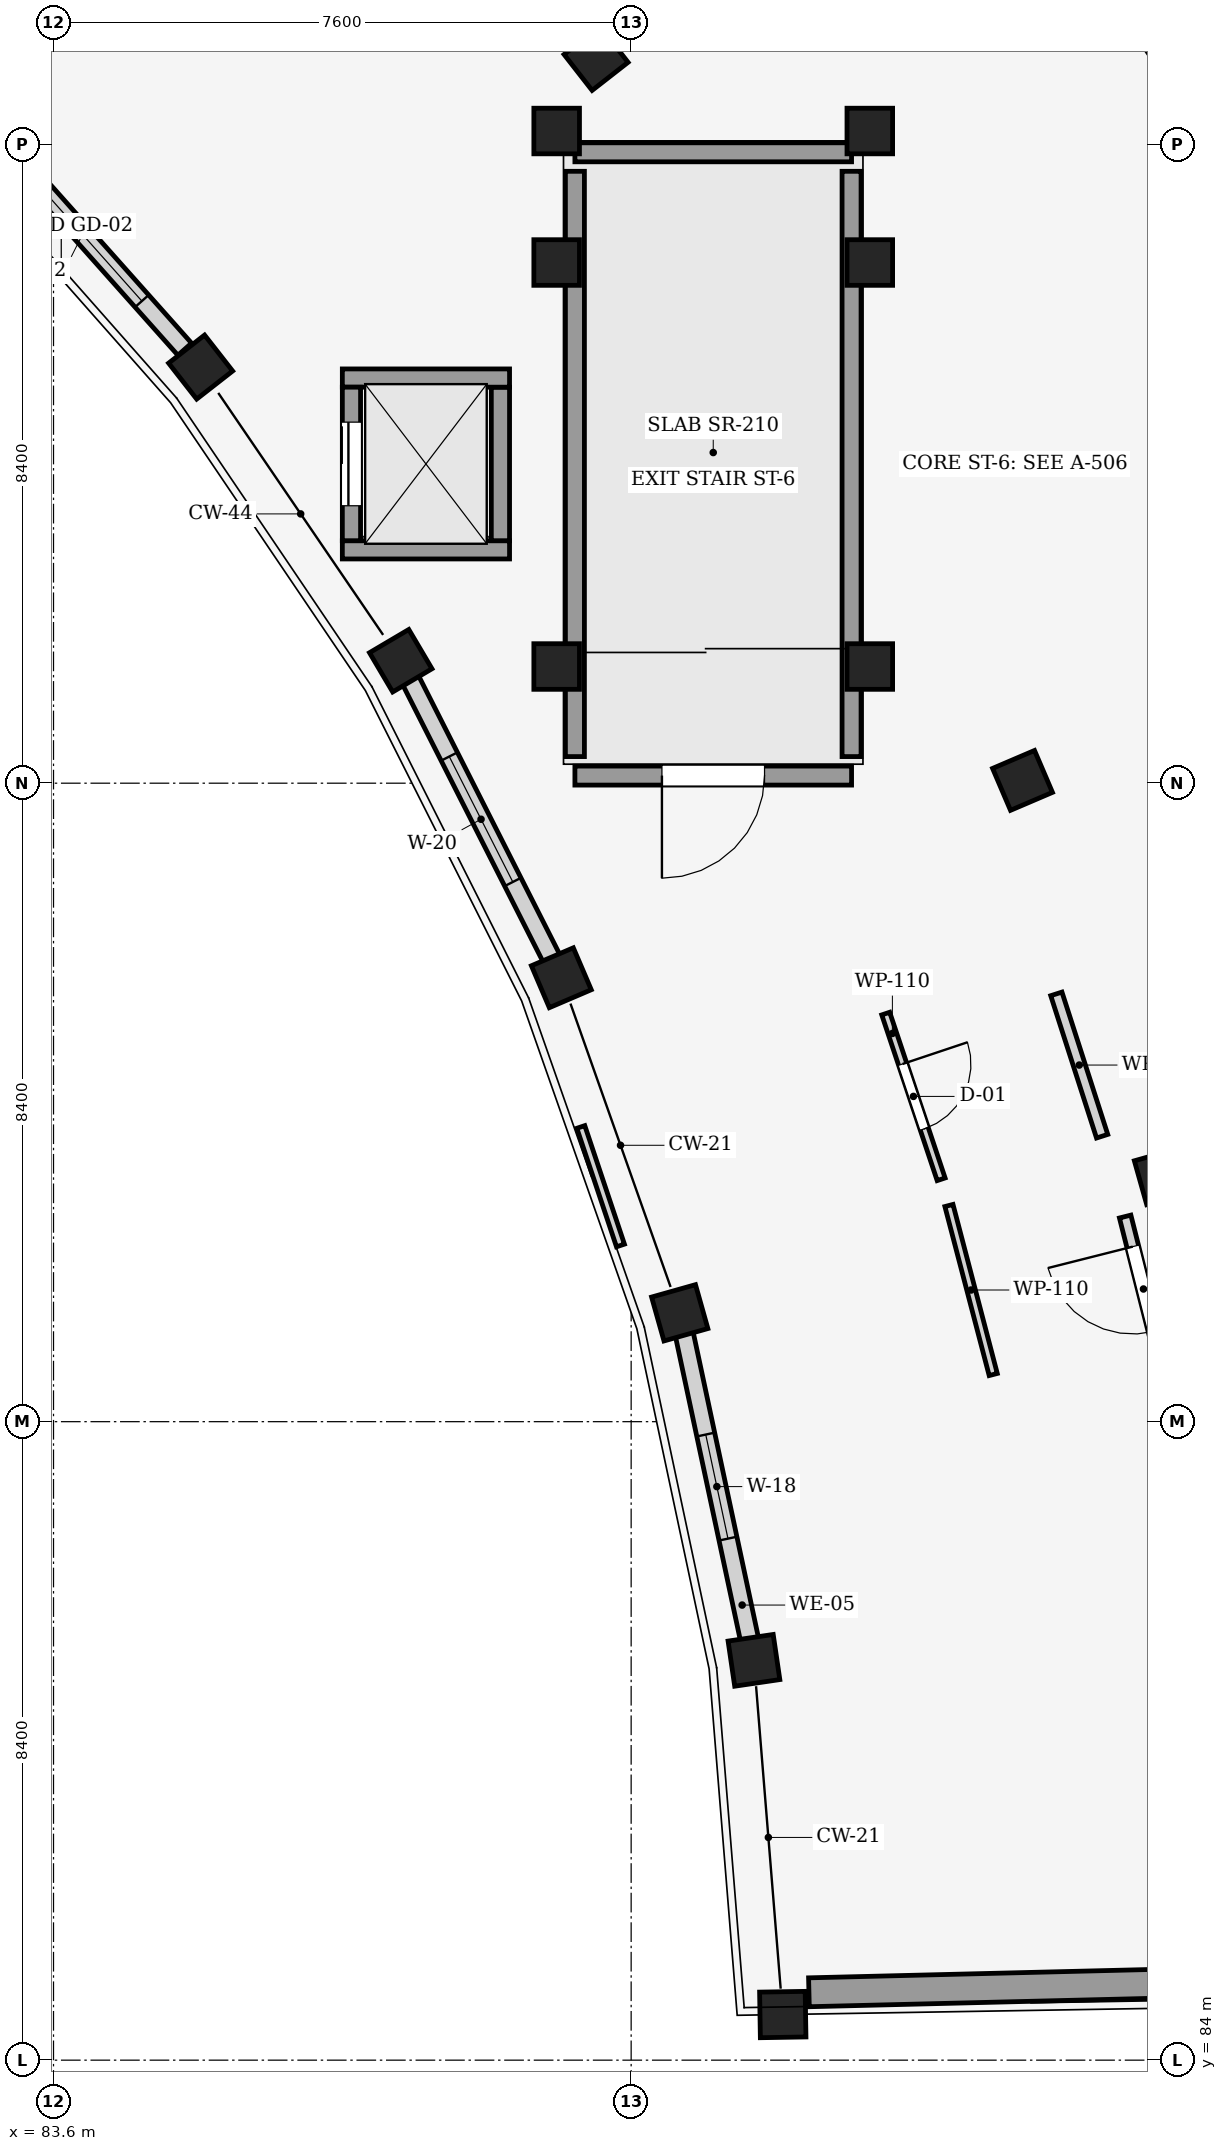
"""IFC4 building model, lengths in metres.
Left out: names, types, materials, properties, quantities, classifications, styles, units other than length and angle.
Written with IfcOpenShell. Run it as: python <this file> out.ifc"""

import sys

from ifc_helpers import new_model, si_unit, direction, frame, frame_2d, origin, origin_2d, place, context, subcontext, project, spatial, rectangle, extrude, element, fill, save


model = new_model("IFC4")
c1 = context("Model", 3, precision=1e-05, world=origin(), true_north=direction((0.0, 1.0)))
c2 = subcontext(c1, "Body", "Model", "MODEL_VIEW")
j1 = project(units=[si_unit("LENGTHUNIT", "METRE"), si_unit("PLANEANGLEUNIT", "RADIAN")], contexts=[c1])
p1 = place(None, origin())
s1 = spatial("IfcSite", under=j1, at=p1, CompositionType="ELEMENT")
p2 = place(p1, origin())
s2 = spatial("IfcBuilding", under=s1, at=p2, CompositionType="ELEMENT")
p3 = place(p2, frame((0.0, 0.0, 25.35)))
s3 = spatial("IfcBuildingStorey", under=s2, at=p3, CompositionType="ELEMENT", Elevation=25.35)
for number, where, z_axis, x_axis in (
    (1, (93.195, 84.6, 0.0), (0.0, 0.0, 1.0), (1.0, 0.017, 0.0)),
    (2, (92.816, 89.26, 0.0), (0.0, 0.0, 1.0), (0.989, 0.145, 0.0)),
    (3, (91.839, 93.832, 0.0), (0.0, 0.0, 1.0), (0.962, 0.272, 0.0)),
    (4, (98.191, 95.625, 0.0), (0.0, 0.0, 1.0), (0.962, 0.272, 0.0)),
    (5, (90.281, 98.24, 0.0), (0.0, 0.0, 1.0), (0.919, 0.393, 0.0)),
    (6, (96.349, 100.837, 0.0), (0.0, 0.0, 1.0), (0.919, 0.393, 0.0)),
    (7, (88.168, 102.411, 0.0), (0.0, 0.0, 1.0), (0.861, 0.509, 0.0)),
    (8, (85.536, 106.274, 0.0), (0.0, 0.0, 1.0), (0.788, 0.615, 0.0)),
    (9, (90.738, 110.336, 0.0), (0.0, 0.0, 1.0), (0.788, 0.615, 0.0)),
):
    element("IfcColumn", number, at=place(p3, frame(where, z_axis=z_axis, x_axis=x_axis)), inside=s3, PredefinedType="COLUMN", context=c2, shape_type="SweptSolid", body=[
        extrude(rectangle(XDim=0.6, YDim=0.6, at=origin_2d()), origin(), (0.0, 0.0, 1.0), 4.05),
    ])
for number, where, z_axis, x_axis in (
    (10, (94.34, 102.335, 0.0), (0.0, 0.0, 1.0), (1.0, 0.0, 0.0)),
    (11, (90.22, 102.335, 0.0), (0.0, 0.0, 1.0), (1.0, 0.0, 0.0)),
    (12, (94.34, 107.65, 0.0), (0.0, 0.0, 1.0), (1.0, 0.0, 0.0)),
    (13, (90.22, 107.65, 0.0), (0.0, 0.0, 1.0), (1.0, 0.0, 0.0)),
    (14, (94.34, 109.38, 0.0), (0.0, 0.0, 1.0), (1.0, 0.0, 0.0)),
    (15, (90.22, 109.38, 0.0), (0.0, 0.0, 1.0), (1.0, 0.0, 0.0)),
):
    element("IfcColumn", number, at=place(p3, frame(where, z_axis=z_axis, x_axis=x_axis)), inside=s3, PredefinedType="COLUMN", context=c2, shape_type="SweptSolid", body=[
        extrude(rectangle(XDim=0.6, YDim=0.6, at=origin_2d()), origin(), (0.0, 0.0, 1.0), 3.1),
    ])
p4 = place(p3, frame((92.766, 89.495, 0.0), z_axis=(0.0, 0.0, 1.0), x_axis=(-0.208893062569, 0.977938489073, 0.0)))
e16 = element("IfcWall", 16, at=p4, inside=s3, PredefinedType="STANDARD", context=c2, shape_type="SweptSolid", body=[
    extrude(rectangle(XDim=4.195, YDim=0.24, at=frame_2d((2.097, 0.0))), origin(), (0.0, 0.0, 1.0), 3.035),
])
p5 = place(p4, frame((1.397, 0.0, 0.85)))
e17 = element("IfcOpeningElement", 17, at=p5, cuts=e16, PredefinedType="OPENING", context=c2, shape_type="SweptSolid", body=[
    extrude(rectangle(XDim=1.4, YDim=1.65, at=frame_2d((0.7, 0.825))), frame((0.0, 0.13, 0.0), z_axis=(0.0, -1.0, 0.0), x_axis=(1.0, 0.0, 0.0)), (0.0, 0.0, 1.0), 0.26),
])
p6 = place(p3, frame((90.162, 98.475, 0.0), z_axis=(0.0, 0.0, 1.0), x_axis=(-0.451915465701, 0.89206076691, 0.0)))
e18 = element("IfcWall", 18, at=p6, inside=s3, PredefinedType="STANDARD", context=c2, shape_type="SweptSolid", body=[
    extrude(rectangle(XDim=4.148, YDim=0.24, at=frame_2d((2.074, 0.0))), origin(), (0.0, 0.0, 1.0), 3.7),
])
p7 = place(p6, frame((1.149, 0.0, 0.85)))
e19 = element("IfcOpeningElement", 19, at=p7, cuts=e18, PredefinedType="OPENING", context=c2, shape_type="SweptSolid", body=[
    extrude(rectangle(XDim=1.85, YDim=1.65, at=frame_2d((0.925, 0.825))), frame((0.0, 0.13, 0.0), z_axis=(0.0, -1.0, 0.0), x_axis=(1.0, 0.0, 0.0)), (0.0, 0.0, 1.0), 0.26),
])
p8 = place(p3, frame((95.786, 113.916, 0.0), z_axis=(0.0, 0.0, 1.0), x_axis=(0.563132935525, -0.826366321269, 0.0)))
e20 = element("IfcWall", 20, at=p8, inside=s3, PredefinedType="STANDARD", context=c2, shape_type="SweptSolid", body=[
    extrude(rectangle(XDim=5.76, YDim=0.29, at=frame_2d((2.88, 0.0))), origin(), (0.0, 0.0, 1.0), 3.035),
])
p9 = place(p8, frame((2.155, 0.0, 0.85)))
e21 = element("IfcOpeningElement", 21, at=p9, cuts=e20, PredefinedType="OPENING", context=c2, shape_type="SweptSolid", body=[
    extrude(rectangle(XDim=1.45, YDim=1.5, at=frame_2d((0.725, 0.75))), frame((0.0, 0.155, 0.0), z_axis=(0.0, -1.0, 0.0), x_axis=(1.0, 0.0, 0.0)), (0.0, 0.0, 1.0), 0.31),
])
p10 = place(p3, frame((85.326, 106.51, 0.0), z_axis=(0.0, 0.0, 1.0), x_axis=(-0.664947894459, 0.74688974933, 0.0)))
e22 = element("IfcWall", 22, at=p10, inside=s3, PredefinedType="STANDARD", context=c2, shape_type="SweptSolid", body=[
    extrude(rectangle(XDim=4.046, YDim=0.24, at=frame_2d((2.023, 0.0))), origin(), (0.0, 0.0, 1.0), 3.185),
])
p11 = place(p10, frame((0.848, 0.0, 0.85)))
e23 = element("IfcOpeningElement", 23, at=p11, cuts=e22, PredefinedType="OPENING", context=c2, shape_type="SweptSolid", body=[
    extrude(rectangle(XDim=2.35, YDim=1.65, at=frame_2d((1.175, 0.825))), frame((0.0, 0.13, 0.0), z_axis=(0.0, -1.0, 0.0), x_axis=(1.0, 0.0, 0.0)), (0.0, 0.0, 1.0), 0.26),
])
p12 = place(p3, frame((105.635, 85.189, 0.0), z_axis=(0.0, 0.0, 1.0), x_axis=(-0.999701441778, -0.024434142249, 0.0)))
e24 = element("IfcWall", 24, at=p12, inside=s3, PredefinedType="SHEAR", context=c2, shape_type="SweptSolid", body=[
    extrude(rectangle(XDim=12.1, YDim=0.38, at=frame_2d((6.05, 0.0))), origin(), (0.0, 0.0, 1.0), 3.75),
])
p13 = place(p3, frame((94.1, 100.9, 0.0), z_axis=(0.0, 0.0, 1.0), x_axis=(-1.0, 0.0, 0.0)))
e25 = element("IfcWall", 25, at=p13, inside=s3, PredefinedType="SHEAR", context=c2, shape_type="SweptSolid", body=[
    extrude(rectangle(XDim=3.64, YDim=0.25, at=frame_2d((1.82, 0.0))), origin(), (0.0, 0.0, 1.0), 3.1),
])
p14 = place(p13, frame((1.145, 0.0, 0.0)))
e26 = element("IfcOpeningElement", 26, at=p14, cuts=e25, PredefinedType="OPENING", context=c2, shape_type="SweptSolid", body=[
    extrude(rectangle(XDim=1.35, YDim=2.2, at=frame_2d((0.675, 1.1))), frame((0.0, 0.135, 0.0), z_axis=(0.0, -1.0, 0.0), x_axis=(1.0, 0.0, 0.0)), (0.0, 0.0, 1.0), 0.27),
])
p15 = place(p3, frame((90.46, 101.15, 0.0), z_axis=(0.0, 0.0, 1.0), x_axis=(0.0, 1.0, 0.0)))
e27 = element("IfcWall", 27, at=p15, inside=s3, PredefinedType="SHEAR", context=c2, shape_type="SweptSolid", body=[
    extrude(rectangle(XDim=7.7, YDim=0.25, at=frame_2d((3.85, 0.0))), origin(), (0.0, 0.0, 1.0), 3.1),
])
p16 = place(p3, frame((90.46, 109.1, 0.0), z_axis=(0.0, 0.0, 1.0), x_axis=(1.0, 0.0, 0.0)))
e28 = element("IfcWall", 28, at=p16, inside=s3, PredefinedType="SHEAR", context=c2, shape_type="SweptSolid", body=[
    extrude(rectangle(XDim=3.64, YDim=0.25, at=frame_2d((1.82, 0.0))), origin(), (0.0, 0.0, 1.0), 3.1),
])
p17 = place(p3, frame((94.1, 108.85, 0.0), z_axis=(0.0, 0.0, 1.0), x_axis=(0.0, -1.0, 0.0)))
e29 = element("IfcWall", 29, at=p17, inside=s3, PredefinedType="SHEAR", context=c2, shape_type="SweptSolid", body=[
    extrude(rectangle(XDim=7.7, YDim=0.25, at=frame_2d((3.85, 0.0))), origin(), (0.0, 0.0, 1.0), 3.1),
])
p18 = place(p3, frame((89.6, 103.87, 0.0), z_axis=(0.0, 0.0, 1.0), x_axis=(-1.0, 0.0, 0.0)))
e30 = element("IfcWall", 30, at=p18, inside=s3, PredefinedType="SHEAR", context=c2, shape_type="SweptSolid", body=[
    extrude(rectangle(XDim=2.2, YDim=0.24, at=frame_2d((1.1, 0.0))), origin(), (0.0, 0.0, 1.0), 4.05),
])
p19 = place(p3, frame((89.48, 106.01, 0.0), z_axis=(0.0, 0.0, 1.0), x_axis=(0.0, -1.0, 0.0)))
e31 = element("IfcWall", 31, at=p19, inside=s3, PredefinedType="SHEAR", context=c2, shape_type="SweptSolid", body=[
    extrude(rectangle(XDim=2.02, YDim=0.24, at=frame_2d((1.01, 0.0))), origin(), (0.0, 0.0, 1.0), 4.05),
])
p20 = place(p3, frame((87.4, 106.13, 0.0), z_axis=(0.0, 0.0, 1.0), x_axis=(1.0, 0.0, 0.0)))
e32 = element("IfcWall", 32, at=p20, inside=s3, PredefinedType="SHEAR", context=c2, shape_type="SweptSolid", body=[
    extrude(rectangle(XDim=2.2, YDim=0.24, at=frame_2d((1.1, 0.0))), origin(), (0.0, 0.0, 1.0), 4.05),
])
p21 = place(p3, frame((87.52, 103.99, 0.0), z_axis=(0.0, 0.0, 1.0), x_axis=(0.0, 1.0, 0.0)))
e33 = element("IfcWall", 33, at=p21, inside=s3, PredefinedType="SHEAR", context=c2, shape_type="SweptSolid", body=[
    extrude(rectangle(XDim=2.02, YDim=0.24, at=frame_2d((1.01, 0.0))), origin(), (0.0, 0.0, 1.0), 4.05),
])
p22 = place(p21, frame((0.46, 0.0, 0.0)))
e34 = element("IfcOpeningElement", 34, at=p22, cuts=e33, PredefinedType="OPENING", context=c2, shape_type="SweptSolid", body=[
    extrude(rectangle(XDim=1.1, YDim=2.15, at=frame_2d((0.55, 1.075))), frame((0.0, 0.13, 0.0), z_axis=(0.0, -1.0, 0.0), x_axis=(1.0, 0.0, 0.0)), (0.0, 0.0, 1.0), 0.26),
])
p23 = place(p3, frame((98.181, 93.191, 0.0), z_axis=(0.0, 0.0, 1.0), x_axis=(-0.244871130076, 0.969555635152, 0.0)))
e35 = element("IfcWall", 35, at=p23, inside=s3, PredefinedType="PARTITIONING", context=c2, shape_type="SweptSolid", body=[
    extrude(rectangle(XDim=1.967, YDim=0.155, at=frame_2d((0.983, 0.0))), origin(), (0.0, 0.0, 1.0), 3.035),
])
p24 = place(p23, frame((0.409, 0.0, 0.0)))
e36 = element("IfcOpeningElement", 36, at=p24, cuts=e35, PredefinedType="OPENING", context=c2, shape_type="SweptSolid", body=[
    extrude(rectangle(XDim=1.15, YDim=2.22, at=frame_2d((0.575, 1.11))), frame((0.0, 0.087, 0.0), z_axis=(0.0, -1.0, 0.0), x_axis=(1.0, 0.0, 0.0)), (0.0, 0.0, 1.0), 0.175),
])
p25 = place(p3, frame((97.397, 96.156, 0.0), z_axis=(0.0, 0.0, 1.0), x_axis=(-0.306193985411, 0.951969139887, 0.0)))
e37 = element("IfcWall", 37, at=p25, inside=s3, PredefinedType="PARTITIONING", context=c2, shape_type="SweptSolid", body=[
    extrude(rectangle(XDim=1.967, YDim=0.155, at=frame_2d((0.983, 0.0))), origin(), (0.0, 0.0, 1.0), 3.72),
])
p26 = place(p3, frame((94.55, 97.769, 0.0), z_axis=(0.0, 0.0, 1.0), x_axis=(0.317151668087, -0.94837483066, 0.0)))
e38 = element("IfcWall", 38, at=p26, inside=s3, PredefinedType="PARTITIONING", context=c2, shape_type="SweptSolid", body=[
    extrude(rectangle(XDim=2.299, YDim=0.11, at=frame_2d((1.149, 0.0))), origin(), (0.0, 0.0, 1.0), 3.72),
])
p27 = place(p26, frame((0.699, 0.0, 0.0)))
e39 = element("IfcOpeningElement", 39, at=p27, cuts=e38, PredefinedType="OPENING", context=c2, shape_type="SweptSolid", body=[
    extrude(rectangle(XDim=0.9, YDim=2.1, at=frame_2d((0.45, 1.05))), frame((0.0, 0.065, 0.0), z_axis=(0.0, -1.0, 0.0), x_axis=(1.0, 0.0, 0.0)), (0.0, 0.0, 1.0), 0.13),
])
p28 = place(p3, frame((95.381, 95.244, 0.0), z_axis=(0.0, 0.0, 1.0), x_axis=(0.253416186792, -0.96735734673, 0.0)))
e40 = element("IfcWall", 40, at=p28, inside=s3, PredefinedType="PARTITIONING", context=c2, shape_type="SweptSolid", body=[
    extrude(rectangle(XDim=2.299, YDim=0.11, at=frame_2d((1.149, 0.0))), origin(), (0.0, 0.0, 1.0), 3.035),
])
p29 = place(p3, frame((91.059, 94.718, 0.0), z_axis=(0.0, 0.0, 1.0), x_axis=(-0.317163065143, 0.948371019227, 0.0)))
e41 = element("IfcWall", 41, at=p29, inside=s3, PredefinedType="PARTITIONING", context=c2, shape_type="SweptSolid", body=[
    extrude(rectangle(XDim=1.644, YDim=0.11, at=frame_2d((0.822, 0.0))), origin(), (0.0, 0.0, 1.0), 3.185),
])
p30 = place(p5, origin())
e42 = element("IfcWindow", 42, at=p30, inside=s3, PartitioningType="SINGLE_PANEL", PredefinedType="WINDOW", context=c2, shape_type="SweptSolid", body=[
    extrude(rectangle(XDim=1.4, YDim=1.65, at=frame_2d((0.7, 0.825))), frame((0.0, 0.03, 0.0), z_axis=(0.0, -1.0, 0.0), x_axis=(1.0, 0.0, 0.0)), (0.0, 0.0, 1.0), 0.06),
])
fill(e17, e42)
p31 = place(p7, origin())
e43 = element("IfcWindow", 43, at=p31, inside=s3, PartitioningType="SINGLE_PANEL", PredefinedType="WINDOW", context=c2, shape_type="SweptSolid", body=[
    extrude(rectangle(XDim=1.85, YDim=1.65, at=frame_2d((0.925, 0.825))), frame((0.0, 0.03, 0.0), z_axis=(0.0, -1.0, 0.0), x_axis=(1.0, 0.0, 0.0)), (0.0, 0.0, 1.0), 0.06),
])
fill(e19, e43)
p32 = place(p11, origin())
e44 = element("IfcWindow", 44, at=p32, inside=s3, PartitioningType="SINGLE_PANEL", PredefinedType="WINDOW", context=c2, shape_type="SweptSolid", body=[
    extrude(rectangle(XDim=2.35, YDim=1.65, at=frame_2d((1.175, 0.825))), frame((0.0, 0.03, 0.0), z_axis=(0.0, -1.0, 0.0), x_axis=(1.0, 0.0, 0.0)), (0.0, 0.0, 1.0), 0.06),
])
fill(e23, e44)
p33 = place(p14, origin())
e45 = element("IfcDoor", 45, at=p33, inside=s3, OperationType="SINGLE_SWING_RIGHT", PredefinedType="DOOR", context=c2, shape_type="SweptSolid", body=[
    extrude(rectangle(XDim=1.35, YDim=2.2, at=frame_2d((0.675, 1.1))), frame((0.0, 0.025, 0.0), z_axis=(0.0, -1.0, 0.0), x_axis=(1.0, 0.0, 0.0)), (0.0, 0.0, 1.0), 0.05),
])
fill(e26, e45)
p34 = place(p22, origin())
e46 = element("IfcDoor", 46, at=p34, inside=s3, OperationType="SLIDING_TO_RIGHT", PredefinedType="DOOR", context=c2, shape_type="SweptSolid", body=[
    extrude(rectangle(XDim=1.1, YDim=2.15, at=frame_2d((0.55, 1.075))), frame((0.0, 0.025, 0.0), z_axis=(0.0, -1.0, 0.0), x_axis=(1.0, 0.0, 0.0)), (0.0, 0.0, 1.0), 0.05),
])
fill(e34, e46)
p35 = place(p24, origin())
e47 = element("IfcDoor", 47, at=p35, inside=s3, OperationType="SINGLE_SWING_RIGHT", PredefinedType="DOOR", context=c2, shape_type="SweptSolid", body=[
    extrude(rectangle(XDim=1.15, YDim=2.22, at=frame_2d((0.575, 1.11))), frame((0.0, 0.025, 0.0), z_axis=(0.0, -1.0, 0.0), x_axis=(1.0, 0.0, 0.0)), (0.0, 0.0, 1.0), 0.05),
])
fill(e36, e47)
p36 = place(p27, origin())
e48 = element("IfcDoor", 48, at=p36, inside=s3, OperationType="SINGLE_SWING_LEFT", PredefinedType="DOOR", context=c2, shape_type="SweptSolid", body=[
    extrude(rectangle(XDim=0.9, YDim=2.1, at=frame_2d((0.45, 1.05))), frame((0.0, 0.025, 0.0), z_axis=(0.0, -1.0, 0.0), x_axis=(1.0, 0.0, 0.0)), (0.0, 0.0, 1.0), 0.05),
])
fill(e39, e48)
save(model, sys.argv[1])
